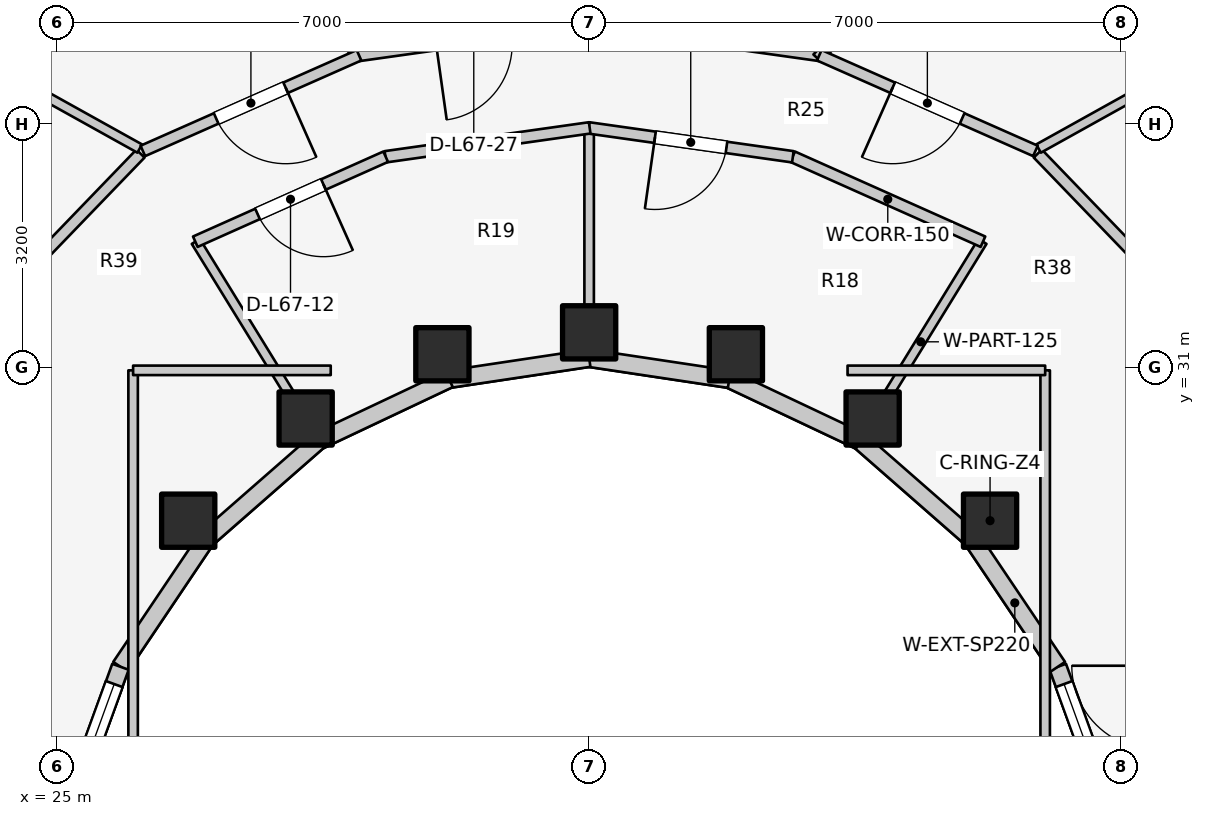
"""IFC4 building model, lengths in metres.
Left out: names, types, materials, properties, quantities, classifications, styles, units other than length and angle.
Written with IfcOpenShell. Run it as: python <this file> out.ifc"""

import sys

from ifc_helpers import new_model, si_unit, direction, frame, frame_2d, origin, origin_2d, place, context, subcontext, project, spatial, rectangle, extrude, element, fill, save


model = new_model("IFC4")
c1 = context("Model", 3, precision=1e-05, world=origin(), true_north=direction((0.0, 1.0)))
c2 = subcontext(c1, "Body", "Model", "MODEL_VIEW")
j1 = project(units=[si_unit("LENGTHUNIT", "METRE"), si_unit("PLANEANGLEUNIT", "RADIAN")], contexts=[c1])
p1 = place(None, origin())
s1 = spatial("IfcSite", under=j1, at=p1, CompositionType="ELEMENT")
p2 = place(p1, origin())
s2 = spatial("IfcBuilding", under=s1, at=p2, CompositionType="ELEMENT")
p3 = place(p2, frame((0.0, 0.0, 220.2)))
s3 = spatial("IfcBuildingStorey", under=s2, at=p3, CompositionType="ELEMENT", Elevation=220.2)
for number, where, z_axis, x_axis in (
    (1, (37.275, 28.982, 0.0), (0.0, 0.0, 1.0), (1.0, 0.0, 0.0)),
    (2, (35.73, 30.327, 0.0), (0.0, 0.0, 1.0), (1.0, 0.0, 0.0)),
    (3, (33.931, 31.172, 0.0), (0.0, 0.0, 1.0), (1.0, 0.0, 0.0)),
    (4, (32.0, 31.46, 0.0), (0.0, 0.0, 1.0), (1.0, 0.0, 0.0)),
    (5, (30.069, 31.172, 0.0), (0.0, 0.0, 1.0), (1.0, 0.0, 0.0)),
    (6, (28.27, 30.327, 0.0), (0.0, 0.0, 1.0), (1.0, 0.0, 0.0)),
    (7, (26.725, 28.982, 0.0), (0.0, 0.0, 1.0), (1.0, 0.0, 0.0)),
):
    element("IfcColumn", number, at=place(p3, frame(where, z_axis=z_axis, x_axis=x_axis)), inside=s3, PredefinedType="COLUMN", context=c2, shape_type="SweptSolid", body=[
        extrude(rectangle(XDim=0.7, YDim=0.7, at=origin_2d()), origin(), (0.0, 0.0, 1.0), 3.1),
    ])
p4 = place(p3, frame((38.877, 25.102, 0.0), z_axis=(0.0, 0.0, 1.0), x_axis=(-0.341423187295, 0.93990968033, 0.0)))
e8 = element("IfcWall", 8, at=p4, inside=s3, PredefinedType="STANDARD", context=c2, shape_type="SweptSolid", body=[
    extrude(rectangle(XDim=2.084, YDim=0.23, at=frame_2d((1.042, 0.0))), origin(), (0.0, 0.0, 1.0), 2.84),
])
p5 = place(p4, frame((0.242, 0.0, 0.85)))
e9 = element("IfcOpeningElement", 9, at=p5, cuts=e8, PredefinedType="OPENING", context=c2, shape_type="SweptSolid", body=[
    extrude(rectangle(XDim=1.6, YDim=1.65, at=frame_2d((0.8, 0.825))), frame((0.0, 0.125, 0.0), z_axis=(0.0, -1.0, 0.0), x_axis=(1.0, 0.0, 0.0)), (0.0, 0.0, 1.0), 0.25),
])
p6 = place(p3, frame((38.166, 27.06, 0.0), z_axis=(0.0, 0.0, 1.0), x_axis=(-0.558197800898, 0.829707909492, 0.0)))
e10 = element("IfcWall", 10, at=p6, inside=s3, PredefinedType="STANDARD", context=c2, shape_type="SweptSolid", body=[
    extrude(rectangle(XDim=2.027, YDim=0.23, at=frame_2d((1.013, 0.0))), origin(), (0.0, 0.0, 1.0), 2.16),
])
p7 = place(p3, frame((37.035, 28.742, 0.0), z_axis=(0.0, 0.0, 1.0), x_axis=(-0.752576694707, 0.658504607869, 0.0)))
e11 = element("IfcWall", 11, at=p7, inside=s3, PredefinedType="STANDARD", context=c2, shape_type="SweptSolid", body=[
    extrude(rectangle(XDim=1.959, YDim=0.23, at=frame_2d((0.98, 0.0))), origin(), (0.0, 0.0, 1.0), 2.16),
])
p8 = place(p3, frame((35.56, 30.032, 0.0), z_axis=(0.0, 0.0, 1.0), x_axis=(-0.904179699603, 0.427152280606, 0.0)))
e12 = element("IfcWall", 12, at=p8, inside=s3, PredefinedType="STANDARD", context=c2, shape_type="SweptSolid", body=[
    extrude(rectangle(XDim=1.899, YDim=0.23, at=frame_2d((0.95, 0.0))), origin(), (0.0, 0.0, 1.0), 2.16),
])
for number, where, z_axis, x_axis in (
    (13, (33.843, 30.843, 0.0), (0.0, 0.0, 1.0), (-0.989, 0.149, 0.0)),
    (14, (32.0, 31.12, 0.0), (0.0, 0.0, 1.0), (-0.989, -0.149, 0.0)),
):
    element("IfcWall", number, at=place(p3, frame(where, z_axis=z_axis, x_axis=x_axis)), inside=s3, PredefinedType="STANDARD", context=c2, shape_type="SweptSolid", body=[
        extrude(rectangle(XDim=1.864, YDim=0.23, at=frame_2d((0.932, 0.0))), origin(), (0.0, 0.0, 1.0), 2.16),
    ])
p9 = place(p3, frame((30.157, 30.843, 0.0), z_axis=(0.0, 0.0, 1.0), x_axis=(-0.904179699603, -0.427152280606, 0.0)))
e15 = element("IfcWall", 15, at=p9, inside=s3, PredefinedType="STANDARD", context=c2, shape_type="SweptSolid", body=[
    extrude(rectangle(XDim=1.899, YDim=0.23, at=frame_2d((0.95, 0.0))), origin(), (0.0, 0.0, 1.0), 2.16),
])
p10 = place(p3, frame((28.44, 30.032, 0.0), z_axis=(0.0, 0.0, 1.0), x_axis=(-0.752576694707, -0.658504607869, 0.0)))
e16 = element("IfcWall", 16, at=p10, inside=s3, PredefinedType="STANDARD", context=c2, shape_type="SweptSolid", body=[
    extrude(rectangle(XDim=1.959, YDim=0.23, at=frame_2d((0.98, 0.0))), origin(), (0.0, 0.0, 1.0), 2.16),
])
p11 = place(p3, frame((26.965, 28.742, 0.0), z_axis=(0.0, 0.0, 1.0), x_axis=(-0.558197800898, -0.829707909492, 0.0)))
e17 = element("IfcWall", 17, at=p11, inside=s3, PredefinedType="STANDARD", context=c2, shape_type="SweptSolid", body=[
    extrude(rectangle(XDim=2.027, YDim=0.23, at=frame_2d((1.013, 0.0))), origin(), (0.0, 0.0, 1.0), 2.16),
])
p12 = place(p3, frame((25.834, 27.06, 0.0), z_axis=(0.0, 0.0, 1.0), x_axis=(-0.341423187295, -0.93990968033, 0.0)))
e18 = element("IfcWall", 18, at=p12, inside=s3, PredefinedType="STANDARD", context=c2, shape_type="SweptSolid", body=[
    extrude(rectangle(XDim=2.084, YDim=0.23, at=frame_2d((1.042, 0.0))), origin(), (0.0, 0.0, 1.0), 2.84),
])
p13 = place(p12, frame((0.242, 0.0, 0.85)))
e19 = element("IfcOpeningElement", 19, at=p13, cuts=e18, PredefinedType="OPENING", context=c2, shape_type="SweptSolid", body=[
    extrude(rectangle(XDim=1.6, YDim=1.65, at=frame_2d((0.8, 0.825))), frame((0.0, 0.125, 0.0), z_axis=(0.0, -1.0, 0.0), x_axis=(1.0, 0.0, 0.0)), (0.0, 0.0, 1.0), 0.25),
])
p14 = place(p3, frame((35.55, 30.015, 0.0), z_axis=(0.0, 0.0, 1.0), x_axis=(0.523992004803, 0.851723182086, 0.0)))
e20 = element("IfcWall", 20, at=p14, inside=s3, PredefinedType="PARTITIONING", context=c2, shape_type="SweptSolid", body=[
    extrude(rectangle(XDim=3.101, YDim=0.125, at=frame_2d((1.551, 0.0))), origin(), (0.0, 0.0, 1.0), 2.376),
])
p15 = place(p3, frame((32.0, 31.1, 0.0), z_axis=(0.0, 0.0, 1.0), x_axis=(0.0, 1.0, 0.0)))
e21 = element("IfcWall", 21, at=p15, inside=s3, PredefinedType="PARTITIONING", context=c2, shape_type="SweptSolid", body=[
    extrude(rectangle(XDim=3.05, YDim=0.125, at=frame_2d((1.525, 0.0))), origin(), (0.0, 0.0, 1.0), 2.376),
])
p16 = place(p3, frame((28.45, 30.015, 0.0), z_axis=(0.0, 0.0, 1.0), x_axis=(-0.523992004803, 0.851723182086, 0.0)))
e22 = element("IfcWall", 22, at=p16, inside=s3, PredefinedType="PARTITIONING", context=c2, shape_type="SweptSolid", body=[
    extrude(rectangle(XDim=3.101, YDim=0.125, at=frame_2d((1.551, 0.0))), origin(), (0.0, 0.0, 1.0), 2.376),
])
p17 = place(p3, frame((37.181, 32.652, 0.0), z_axis=(0.0, 0.0, 1.0), x_axis=(-0.913120130558, 0.407690602257, 0.0)))
e23 = element("IfcWall", 23, at=p17, inside=s3, PredefinedType="PARTITIONING", context=c2, shape_type="SweptSolid", body=[
    extrude(rectangle(XDim=2.743, YDim=0.15, at=frame_2d((1.371, 0.0))), origin(), (0.0, 0.0, 1.0), 2.376),
])
p18 = place(p3, frame((34.68, 33.77, 0.0), z_axis=(0.0, 0.0, 1.0), x_axis=(-0.990132151456, 0.140136799779, 0.0)))
e24 = element("IfcWall", 24, at=p18, inside=s3, PredefinedType="PARTITIONING", context=c2, shape_type="SweptSolid", body=[
    extrude(rectangle(XDim=2.714, YDim=0.15, at=frame_2d((1.357, 0.0))), origin(), (0.0, 0.0, 1.0), 2.376),
])
p19 = place(p18, frame((0.882, 0.0, 0.0)))
e25 = element("IfcOpeningElement", 25, at=p19, cuts=e24, PredefinedType="OPENING", context=c2, shape_type="SweptSolid", body=[
    extrude(rectangle(XDim=0.95, YDim=2.1, at=frame_2d((0.475, 1.05))), frame((0.0, 0.085, 0.0), z_axis=(0.0, -1.0, 0.0), x_axis=(1.0, 0.0, 0.0)), (0.0, 0.0, 1.0), 0.17),
])
p20 = place(p3, frame((32.007, 34.15, 0.0), z_axis=(0.0, 0.0, 1.0), x_axis=(-0.990132151456, -0.140136799779, 0.0)))
e26 = element("IfcWall", 26, at=p20, inside=s3, PredefinedType="PARTITIONING", context=c2, shape_type="SweptSolid", body=[
    extrude(rectangle(XDim=2.714, YDim=0.15, at=frame_2d((1.357, 0.0))), origin(), (0.0, 0.0, 1.0), 2.376),
])
p21 = place(p3, frame((29.323, 33.771, 0.0), z_axis=(0.0, 0.0, 1.0), x_axis=(-0.913120130558, -0.407690602257, 0.0)))
e27 = element("IfcWall", 27, at=p21, inside=s3, PredefinedType="PARTITIONING", context=c2, shape_type="SweptSolid", body=[
    extrude(rectangle(XDim=2.743, YDim=0.15, at=frame_2d((1.371, 0.0))), origin(), (0.0, 0.0, 1.0), 2.376),
])
p22 = place(p21, frame((0.896, 0.0, 0.0)))
e28 = element("IfcOpeningElement", 28, at=p22, cuts=e27, PredefinedType="OPENING", context=c2, shape_type="SweptSolid", body=[
    extrude(rectangle(XDim=0.95, YDim=2.1, at=frame_2d((0.475, 1.05))), frame((0.0, 0.085, 0.0), z_axis=(0.0, -1.0, 0.0), x_axis=(1.0, 0.0, 0.0)), (0.0, 0.0, 1.0), 0.17),
])
p23 = place(p3, frame((26.0, 25.8, 0.0), z_axis=(0.0, 0.0, 1.0), x_axis=(0.0, 1.0, 0.0)))
e29 = element("IfcWall", 29, at=p23, inside=s3, PredefinedType="PARTITIONING", context=c2, shape_type="SweptSolid", body=[
    extrude(rectangle(XDim=5.16, YDim=0.125, at=frame_2d((2.58, 0.0))), origin(), (0.0, 0.0, 1.0), 2.232),
])
p24 = place(p3, frame((26.0, 30.96, 0.0), z_axis=(0.0, 0.0, 1.0), x_axis=(1.0, 0.0, 0.0)))
e30 = element("IfcWall", 30, at=p24, inside=s3, PredefinedType="PARTITIONING", context=c2, shape_type="SweptSolid", body=[
    extrude(rectangle(XDim=2.6, YDim=0.125, at=frame_2d((1.3, 0.0))), origin(), (0.0, 0.0, 1.0), 2.376),
])
p25 = place(p3, frame((38.0, 25.8, 0.0), z_axis=(0.0, 0.0, 1.0), x_axis=(0.0, 1.0, 0.0)))
e31 = element("IfcWall", 31, at=p25, inside=s3, PredefinedType="PARTITIONING", context=c2, shape_type="SweptSolid", body=[
    extrude(rectangle(XDim=5.16, YDim=0.125, at=frame_2d((2.58, 0.0))), origin(), (0.0, 0.0, 1.0), 2.232),
])
p26 = place(p3, frame((35.4, 30.96, 0.0), z_axis=(0.0, 0.0, 1.0), x_axis=(1.0, 0.0, 0.0)))
e32 = element("IfcWall", 32, at=p26, inside=s3, PredefinedType="PARTITIONING", context=c2, shape_type="SweptSolid", body=[
    extrude(rectangle(XDim=2.6, YDim=0.125, at=frame_2d((1.3, 0.0))), origin(), (0.0, 0.0, 1.0), 2.376),
])
for number, where, z_axis, x_axis in (
    (33, (37.903, 33.812, 0.0), (0.0, 0.0, 1.0), (0.694, -0.72, 0.0)),
    (34, (26.097, 33.812, 0.0), (0.0, 0.0, 1.0), (-0.694, -0.72, 0.0)),
):
    element("IfcWall", number, at=place(p3, frame(where, z_axis=z_axis, x_axis=x_axis)), inside=s3, PredefinedType="PARTITIONING", context=c2, shape_type="SweptSolid", body=[
        extrude(rectangle(XDim=2.158, YDim=0.15, at=frame_2d((1.079, 0.0))), origin(), (0.0, 0.0, 1.0), 2.376),
    ])
p27 = place(p3, frame((37.913, 33.878, 0.0), z_axis=(0.0, 0.0, 1.0), x_axis=(0.87377679808, 0.486327160599, 0.0)))
e35 = element("IfcWall", 35, at=p27, inside=s3, PredefinedType="PARTITIONING", context=c2, shape_type="SweptSolid", body=[
    extrude(rectangle(XDim=6.24, YDim=0.125, at=frame_2d((3.12, 0.0))), origin(), (0.0, 0.0, 1.0), 2.376),
])
p28 = place(p3, frame((28.926, 35.143, 0.0), z_axis=(0.0, 0.0, 1.0), x_axis=(-0.691128003726, 0.722732372642, 0.0)))
e36 = element("IfcWall", 36, at=p28, inside=s3, PredefinedType="PARTITIONING", context=c2, shape_type="SweptSolid", body=[
    extrude(rectangle(XDim=5.33, YDim=0.125, at=frame_2d((2.665, 0.0))), origin(), (0.0, 0.0, 1.0), 2.376),
])
p29 = place(p3, frame((26.087, 33.878, 0.0), z_axis=(0.0, 0.0, 1.0), x_axis=(-0.87377679808, 0.486327160599, 0.0)))
e37 = element("IfcWall", 37, at=p29, inside=s3, PredefinedType="PARTITIONING", context=c2, shape_type="SweptSolid", body=[
    extrude(rectangle(XDim=6.24, YDim=0.125, at=frame_2d((3.12, 0.0))), origin(), (0.0, 0.0, 1.0), 2.376),
])
p30 = place(p3, frame((35.085, 35.096, 0.0), z_axis=(0.0, 0.0, 1.0), x_axis=(-0.990254086283, 0.139272555084, 0.0)))
e38 = element("IfcWall", 38, at=p30, inside=s3, PredefinedType="PARTITIONING", context=c2, shape_type="SweptSolid", body=[
    extrude(rectangle(XDim=3.166, YDim=0.15, at=frame_2d((1.583, 0.0))), origin(), (0.0, 0.0, 1.0), 2.376),
])
p31 = place(p3, frame((35.001, 35.067, 0.0), z_axis=(0.0, 0.0, 1.0), x_axis=(0.691180416361, 0.722682248321, 0.0)))
e39 = element("IfcWall", 39, at=p31, inside=s3, PredefinedType="PLUMBINGWALL", context=c2, shape_type="SweptSolid", body=[
    extrude(rectangle(XDim=2.1, YDim=0.14, at=frame_2d((1.05, 0.0))), origin(), (0.0, 0.0, 1.0), 2.385),
])
p32 = place(p3, frame((37.872, 33.847, 0.0), z_axis=(0.0, 0.0, 1.0), x_axis=(-0.914490094652, 0.40460828808, 0.0)))
e40 = element("IfcWall", 40, at=p32, inside=s3, PredefinedType="PARTITIONING", context=c2, shape_type="SweptSolid", body=[
    extrude(rectangle(XDim=3.11, YDim=0.15, at=frame_2d((1.555, 0.0))), origin(), (0.0, 0.0, 1.0), 2.376),
])
p33 = place(p32, frame((1.055, 0.0, 0.0)))
e41 = element("IfcOpeningElement", 41, at=p33, cuts=e40, PredefinedType="OPENING", context=c2, shape_type="SweptSolid", body=[
    extrude(rectangle(XDim=1.0, YDim=2.1, at=frame_2d((0.5, 1.05))), frame((0.0, 0.085, 0.0), z_axis=(0.0, -1.0, 0.0), x_axis=(1.0, 0.0, 0.0)), (0.0, 0.0, 1.0), 0.17),
])
p34 = place(p3, frame((32.008, 35.53, 0.0), z_axis=(0.0, 0.0, 1.0), x_axis=(-0.990257602807, -0.139247549651, 0.0)))
e42 = element("IfcWall", 42, at=p34, inside=s3, PredefinedType="PARTITIONING", context=c2, shape_type="SweptSolid", body=[
    extrude(rectangle(XDim=3.082, YDim=0.15, at=frame_2d((1.541, 0.0))), origin(), (0.0, 0.0, 1.0), 2.376),
])
p35 = place(p34, frame((1.041, 0.0, 0.0)))
e43 = element("IfcOpeningElement", 43, at=p35, cuts=e42, PredefinedType="OPENING", context=c2, shape_type="SweptSolid", body=[
    extrude(rectangle(XDim=1.0, YDim=2.1, at=frame_2d((0.5, 1.05))), frame((0.0, 0.085, 0.0), z_axis=(0.0, -1.0, 0.0), x_axis=(1.0, 0.0, 0.0)), (0.0, 0.0, 1.0), 0.17),
])
p36 = place(p3, frame((28.972, 35.105, 0.0), z_axis=(0.0, 0.0, 1.0), x_axis=(-0.914490094652, -0.40460828808, 0.0)))
e44 = element("IfcWall", 44, at=p36, inside=s3, PredefinedType="PARTITIONING", context=c2, shape_type="SweptSolid", body=[
    extrude(rectangle(XDim=3.11, YDim=0.15, at=frame_2d((1.555, 0.0))), origin(), (0.0, 0.0, 1.0), 2.376),
])
p37 = place(p36, frame((1.055, 0.0, 0.0)))
e45 = element("IfcOpeningElement", 45, at=p37, cuts=e44, PredefinedType="OPENING", context=c2, shape_type="SweptSolid", body=[
    extrude(rectangle(XDim=1.0, YDim=2.1, at=frame_2d((0.5, 1.05))), frame((0.0, 0.085, 0.0), z_axis=(0.0, -1.0, 0.0), x_axis=(1.0, 0.0, 0.0)), (0.0, 0.0, 1.0), 0.17),
])
p38 = place(p5, origin())
e46 = element("IfcWindow", 46, at=p38, inside=s3, PartitioningType="SINGLE_PANEL", PredefinedType="WINDOW", context=c2, shape_type="SweptSolid", body=[
    extrude(rectangle(XDim=1.6, YDim=1.65, at=frame_2d((0.8, 0.825))), frame((0.0, 0.03, 0.0), z_axis=(0.0, -1.0, 0.0), x_axis=(1.0, 0.0, 0.0)), (0.0, 0.0, 1.0), 0.06),
])
fill(e9, e46)
p39 = place(p13, origin())
e47 = element("IfcWindow", 47, at=p39, inside=s3, PartitioningType="SINGLE_PANEL", PredefinedType="WINDOW", context=c2, shape_type="SweptSolid", body=[
    extrude(rectangle(XDim=1.6, YDim=1.65, at=frame_2d((0.8, 0.825))), frame((0.0, 0.03, 0.0), z_axis=(0.0, -1.0, 0.0), x_axis=(1.0, 0.0, 0.0)), (0.0, 0.0, 1.0), 0.06),
])
fill(e19, e47)
p40 = place(p19, origin())
e48 = element("IfcDoor", 48, at=p40, inside=s3, OperationType="SINGLE_SWING_RIGHT", PredefinedType="DOOR", context=c2, shape_type="SweptSolid", body=[
    extrude(rectangle(XDim=0.95, YDim=2.1, at=frame_2d((0.475, 1.05))), frame((0.0, 0.025, 0.0), z_axis=(0.0, -1.0, 0.0), x_axis=(1.0, 0.0, 0.0)), (0.0, 0.0, 1.0), 0.05),
])
fill(e25, e48)
p41 = place(p22, origin())
e49 = element("IfcDoor", 49, at=p41, inside=s3, OperationType="SINGLE_SWING_LEFT", PredefinedType="DOOR", context=c2, shape_type="SweptSolid", body=[
    extrude(rectangle(XDim=0.95, YDim=2.1, at=frame_2d((0.475, 1.05))), frame((0.0, 0.025, 0.0), z_axis=(0.0, -1.0, 0.0), x_axis=(1.0, 0.0, 0.0)), (0.0, 0.0, 1.0), 0.05),
])
fill(e28, e49)
p42 = place(p33, origin())
e50 = element("IfcDoor", 50, at=p42, inside=s3, OperationType="SINGLE_SWING_RIGHT", PredefinedType="DOOR", context=c2, shape_type="SweptSolid", body=[
    extrude(rectangle(XDim=1.0, YDim=2.1, at=frame_2d((0.5, 1.05))), frame((0.0, 0.025, 0.0), z_axis=(0.0, -1.0, 0.0), x_axis=(1.0, 0.0, 0.0)), (0.0, 0.0, 1.0), 0.05),
])
fill(e41, e50)
p43 = place(p37, origin())
e51 = element("IfcDoor", 51, at=p43, inside=s3, OperationType="SINGLE_SWING_LEFT", PredefinedType="DOOR", context=c2, shape_type="SweptSolid", body=[
    extrude(rectangle(XDim=1.0, YDim=2.1, at=frame_2d((0.5, 1.05))), frame((0.0, 0.025, 0.0), z_axis=(0.0, -1.0, 0.0), x_axis=(1.0, 0.0, 0.0)), (0.0, 0.0, 1.0), 0.05),
])
fill(e45, e51)
save(model, sys.argv[1])
